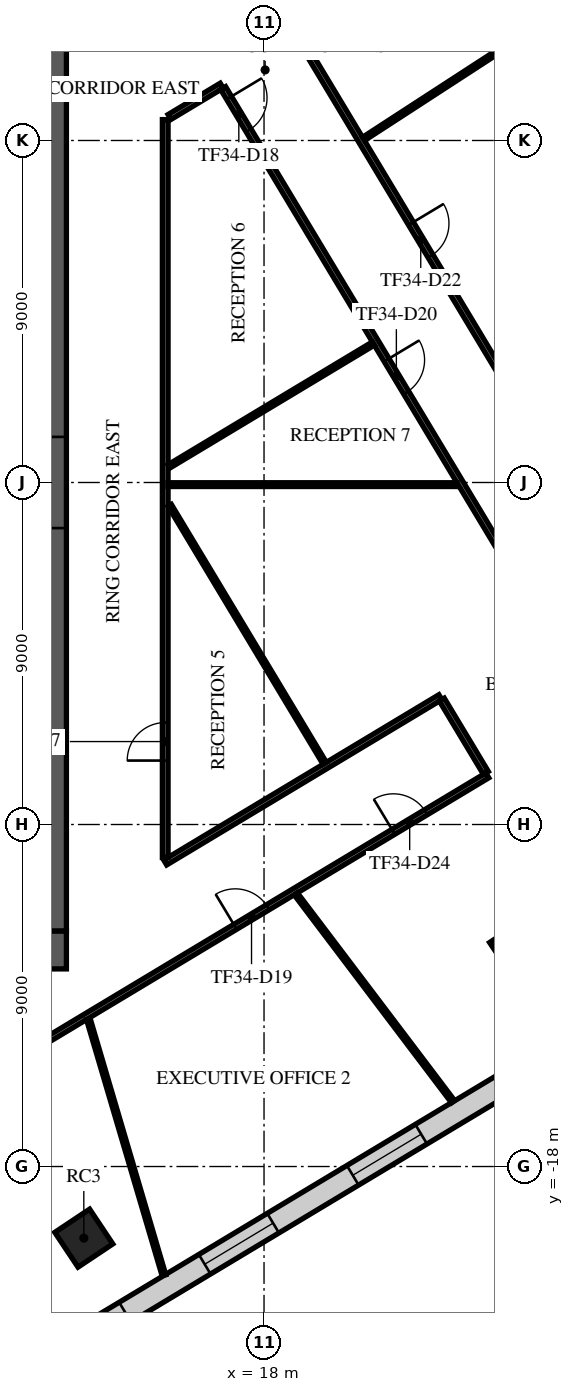
"""IFC4 building model, lengths in metres.
Left out: names, types, materials, properties, quantities, classifications, styles, units other than length and angle.
Written with IfcOpenShell. Run it as: python <this file> out.ifc"""

import sys

from ifc_helpers import new_model, si_unit, direction, frame, frame_2d, origin, origin_2d, place, context, subcontext, project, spatial, rectangle, extrude, element, fill, save


model = new_model("IFC4")
c1 = context("Model", 3, precision=1e-05, world=origin(), true_north=direction((0.0, 1.0)))
c2 = subcontext(c1, "Body", "Model", "MODEL_VIEW")
j1 = project(units=[si_unit("LENGTHUNIT", "METRE"), si_unit("PLANEANGLEUNIT", "RADIAN")], contexts=[c1])
p1 = place(None, origin())
s1 = spatial("IfcSite", under=j1, at=p1, CompositionType="ELEMENT")
p2 = place(p1, origin())
s2 = spatial("IfcBuilding", under=s1, at=p2, CompositionType="ELEMENT")
p3 = place(p2, frame((0.0, 0.0, 147.7)))
s3 = spatial("IfcBuildingStorey", under=s2, at=p3, CompositionType="ELEMENT", Elevation=147.7)
for number, where, z_axis, x_axis in (
    (1, (13.258, -19.885, 0.0), (0.0, 0.0, 1.0), (0.832, 0.555, 0.0)),
    (2, (24.699, -12.258, 0.0), (0.0, 0.0, 1.0), (0.832, 0.555, 0.0)),
):
    element("IfcColumn", number, at=place(p3, frame(where, z_axis=z_axis, x_axis=x_axis)), inside=s3, PredefinedType="COLUMN", context=c2, shape_type="SweptSolid", body=[
        extrude(rectangle(XDim=1.1, YDim=1.1, at=origin_2d()), origin(), (0.0, 0.0, 1.0), 4.0),
    ])
p4 = place(p3, frame((-12.8, -12.3, 0.0), z_axis=(0.0, 0.0, 1.0), x_axis=(1.0, 0.0, 0.0)))
e3 = element("IfcWall", 3, at=p4, inside=s3, PredefinedType="SHEAR", context=c2, shape_type="SweptSolid", body=[
    extrude(rectangle(XDim=25.6, YDim=1.0, at=frame_2d((12.8, 0.0))), origin(), (0.0, 0.0, 1.0), 3.6),
])
p5 = place(p4, frame((7.7, 0.0, 0.0)))
e4 = element("IfcOpeningElement", 4, at=p5, cuts=e3, PredefinedType="OPENING", context=c2, shape_type="SweptSolid", body=[
    extrude(rectangle(XDim=2.0, YDim=2.1, at=frame_2d((1.0, 1.05))), frame((0.0, 0.51, 0.0), z_axis=(0.0, -1.0, 0.0), x_axis=(1.0, 0.0, 0.0)), (0.0, 0.0, 1.0), 1.02),
])
p6 = place(p4, frame((17.825, 0.0, 0.0)))
e5 = element("IfcOpeningElement", 5, at=p6, cuts=e3, PredefinedType="OPENING", context=c2, shape_type="SweptSolid", body=[
    extrude(rectangle(XDim=1.2, YDim=2.1, at=frame_2d((0.6, 1.05))), frame((0.0, 0.51, 0.0), z_axis=(0.0, -1.0, 0.0), x_axis=(1.0, 0.0, 0.0)), (0.0, 0.0, 1.0), 1.02),
])
p7 = place(p4, frame((1.975, 0.0, 0.0)))
e6 = element("IfcOpeningElement", 6, at=p7, cuts=e3, PredefinedType="OPENING", context=c2, shape_type="SweptSolid", body=[
    extrude(rectangle(XDim=1.2, YDim=2.1, at=frame_2d((0.6, 1.05))), frame((0.0, 0.51, 0.0), z_axis=(0.0, -1.0, 0.0), x_axis=(1.0, 0.0, 0.0)), (0.0, 0.0, 1.0), 1.02),
])
p8 = place(p4, frame((22.425, 0.0, 0.0)))
e7 = element("IfcOpeningElement", 7, at=p8, cuts=e3, PredefinedType="OPENING", context=c2, shape_type="SweptSolid", body=[
    extrude(rectangle(XDim=1.2, YDim=2.1, at=frame_2d((0.6, 1.05))), frame((0.0, 0.51, 0.0), z_axis=(0.0, -1.0, 0.0), x_axis=(1.0, 0.0, 0.0)), (0.0, 0.0, 1.0), 1.02),
])
p9 = place(p3, frame((12.3, -11.8, 0.0), z_axis=(0.0, 0.0, 1.0), x_axis=(0.0, 1.0, 0.0)))
e8 = element("IfcWall", 8, at=p9, inside=s3, PredefinedType="SHEAR", context=c2, shape_type="SweptSolid", body=[
    extrude(rectangle(XDim=23.6, YDim=1.0, at=frame_2d((11.8, 0.0))), origin(), (0.0, 0.0, 1.0), 3.6),
])
p10 = place(p9, frame((10.6, 0.0, 0.0)))
e9 = element("IfcOpeningElement", 9, at=p10, cuts=e8, PredefinedType="OPENING", context=c2, shape_type="SweptSolid", body=[
    extrude(rectangle(XDim=2.4, YDim=2.4, at=frame_2d((1.2, 1.2))), frame((0.0, 0.51, 0.0), z_axis=(0.0, -1.0, 0.0), x_axis=(1.0, 0.0, 0.0)), (0.0, 0.0, 1.0), 1.02),
])
p11 = place(p3, frame((-7.88, -35.184, 0.0), z_axis=(0.0, 0.0, 1.0), x_axis=(0.857165846238, 0.515040495536, 0.0)))
e10 = element("IfcWall", 10, at=p11, inside=s3, PredefinedType="STANDARD", context=c2, shape_type="SweptSolid", body=[
    extrude(rectangle(XDim=49.751, YDim=0.6, at=frame_2d((24.876, 0.0))), origin(), (0.0, 0.0, 1.0), 3.6),
])
p12 = place(p11, frame((1.161, 0.0, 0.9)))
e11 = element("IfcOpeningElement", 11, at=p12, cuts=e10, PredefinedType="OPENING", context=c2, shape_type="SweptSolid", body=[
    extrude(rectangle(XDim=2.1, YDim=2.1, at=frame_2d((1.05, 1.05))), frame((0.0, 0.31, 0.0), z_axis=(0.0, -1.0, 0.0), x_axis=(1.0, 0.0, 0.0)), (0.0, 0.0, 1.0), 0.62),
])
p13 = place(p11, frame((5.644, 0.0, 0.9)))
e12 = element("IfcOpeningElement", 12, at=p13, cuts=e10, PredefinedType="OPENING", context=c2, shape_type="SweptSolid", body=[
    extrude(rectangle(XDim=2.1, YDim=2.1, at=frame_2d((1.05, 1.05))), frame((0.0, 0.31, 0.0), z_axis=(0.0, -1.0, 0.0), x_axis=(1.0, 0.0, 0.0)), (0.0, 0.0, 1.0), 0.62),
])
p14 = place(p11, frame((10.189, 0.0, 0.9)))
e13 = element("IfcOpeningElement", 13, at=p14, cuts=e10, PredefinedType="OPENING", context=c2, shape_type="SweptSolid", body=[
    extrude(rectangle(XDim=2.1, YDim=2.1, at=frame_2d((1.05, 1.05))), frame((0.0, 0.31, 0.0), z_axis=(0.0, -1.0, 0.0), x_axis=(1.0, 0.0, 0.0)), (0.0, 0.0, 1.0), 0.62),
])
p15 = place(p11, frame((14.735, 0.0, 0.9)))
e14 = element("IfcOpeningElement", 14, at=p15, cuts=e10, PredefinedType="OPENING", context=c2, shape_type="SweptSolid", body=[
    extrude(rectangle(XDim=2.1, YDim=2.1, at=frame_2d((1.05, 1.05))), frame((0.0, 0.31, 0.0), z_axis=(0.0, -1.0, 0.0), x_axis=(1.0, 0.0, 0.0)), (0.0, 0.0, 1.0), 0.62),
])
p16 = place(p11, frame((19.28, 0.0, 0.9)))
e15 = element("IfcOpeningElement", 15, at=p16, cuts=e10, PredefinedType="OPENING", context=c2, shape_type="SweptSolid", body=[
    extrude(rectangle(XDim=2.1, YDim=2.1, at=frame_2d((1.05, 1.05))), frame((0.0, 0.31, 0.0), z_axis=(0.0, -1.0, 0.0), x_axis=(1.0, 0.0, 0.0)), (0.0, 0.0, 1.0), 0.62),
])
p17 = place(p11, frame((23.826, 0.0, 0.9)))
e16 = element("IfcOpeningElement", 16, at=p17, cuts=e10, PredefinedType="OPENING", context=c2, shape_type="SweptSolid", body=[
    extrude(rectangle(XDim=2.1, YDim=2.1, at=frame_2d((1.05, 1.05))), frame((0.0, 0.31, 0.0), z_axis=(0.0, -1.0, 0.0), x_axis=(1.0, 0.0, 0.0)), (0.0, 0.0, 1.0), 0.62),
])
p18 = place(p11, frame((28.371, 0.0, 0.9)))
e17 = element("IfcOpeningElement", 17, at=p18, cuts=e10, PredefinedType="OPENING", context=c2, shape_type="SweptSolid", body=[
    extrude(rectangle(XDim=2.1, YDim=2.1, at=frame_2d((1.05, 1.05))), frame((0.0, 0.31, 0.0), z_axis=(0.0, -1.0, 0.0), x_axis=(1.0, 0.0, 0.0)), (0.0, 0.0, 1.0), 0.62),
])
p19 = place(p11, frame((32.917, 0.0, 0.9)))
e18 = element("IfcOpeningElement", 18, at=p19, cuts=e10, PredefinedType="OPENING", context=c2, shape_type="SweptSolid", body=[
    extrude(rectangle(XDim=2.1, YDim=2.1, at=frame_2d((1.05, 1.05))), frame((0.0, 0.31, 0.0), z_axis=(0.0, -1.0, 0.0), x_axis=(1.0, 0.0, 0.0)), (0.0, 0.0, 1.0), 0.62),
])
p20 = place(p11, frame((37.462, 0.0, 0.9)))
e19 = element("IfcOpeningElement", 19, at=p20, cuts=e10, PredefinedType="OPENING", context=c2, shape_type="SweptSolid", body=[
    extrude(rectangle(XDim=2.1, YDim=2.1, at=frame_2d((1.05, 1.05))), frame((0.0, 0.31, 0.0), z_axis=(0.0, -1.0, 0.0), x_axis=(1.0, 0.0, 0.0)), (0.0, 0.0, 1.0), 0.62),
])
p21 = place(p11, frame((42.008, 0.0, 0.9)))
e20 = element("IfcOpeningElement", 20, at=p21, cuts=e10, PredefinedType="OPENING", context=c2, shape_type="SweptSolid", body=[
    extrude(rectangle(XDim=2.1, YDim=2.1, at=frame_2d((1.05, 1.05))), frame((0.0, 0.31, 0.0), z_axis=(0.0, -1.0, 0.0), x_axis=(1.0, 0.0, 0.0)), (0.0, 0.0, 1.0), 0.62),
])
p22 = place(p11, frame((46.491, 0.0, 0.9)))
e21 = element("IfcOpeningElement", 21, at=p22, cuts=e10, PredefinedType="OPENING", context=c2, shape_type="SweptSolid", body=[
    extrude(rectangle(XDim=2.1, YDim=2.1, at=frame_2d((1.05, 1.05))), frame((0.0, 0.31, 0.0), z_axis=(0.0, -1.0, 0.0), x_axis=(1.0, 0.0, 0.0)), (0.0, 0.0, 1.0), 0.62),
])
p23 = place(p3, frame((36.416, -2.94, 0.0), z_axis=(0.0, 0.0, 1.0), x_axis=(-0.515039615037, 0.857166375299, 0.0)))
e22 = element("IfcWall", 22, at=p23, inside=s3, PredefinedType="STANDARD", context=c2, shape_type="SweptSolid", body=[
    extrude(rectangle(XDim=42.176, YDim=0.6, at=frame_2d((21.088, 0.0))), origin(), (0.0, 0.0, 1.0), 3.6),
])
p24 = place(p23, frame((1.138, 0.0, 0.9)))
e23 = element("IfcOpeningElement", 23, at=p24, cuts=e22, PredefinedType="OPENING", context=c2, shape_type="SweptSolid", body=[
    extrude(rectangle(XDim=2.3, YDim=2.1, at=frame_2d((1.15, 1.05))), frame((0.0, 0.31, 0.0), z_axis=(0.0, -1.0, 0.0), x_axis=(1.0, 0.0, 0.0)), (0.0, 0.0, 1.0), 0.62),
])
p25 = place(p23, frame((5.776, 0.0, 0.9)))
e24 = element("IfcOpeningElement", 24, at=p25, cuts=e22, PredefinedType="OPENING", context=c2, shape_type="SweptSolid", body=[
    extrude(rectangle(XDim=2.3, YDim=2.1, at=frame_2d((1.15, 1.05))), frame((0.0, 0.31, 0.0), z_axis=(0.0, -1.0, 0.0), x_axis=(1.0, 0.0, 0.0)), (0.0, 0.0, 1.0), 0.62),
])
p26 = place(p23, frame((10.476, 0.0, 0.9)))
e25 = element("IfcOpeningElement", 25, at=p26, cuts=e22, PredefinedType="OPENING", context=c2, shape_type="SweptSolid", body=[
    extrude(rectangle(XDim=2.3, YDim=2.1, at=frame_2d((1.15, 1.05))), frame((0.0, 0.31, 0.0), z_axis=(0.0, -1.0, 0.0), x_axis=(1.0, 0.0, 0.0)), (0.0, 0.0, 1.0), 0.62),
])
p27 = place(p23, frame((15.176, 0.0, 0.9)))
e26 = element("IfcOpeningElement", 26, at=p27, cuts=e22, PredefinedType="OPENING", context=c2, shape_type="SweptSolid", body=[
    extrude(rectangle(XDim=2.3, YDim=2.1, at=frame_2d((1.15, 1.05))), frame((0.0, 0.31, 0.0), z_axis=(0.0, -1.0, 0.0), x_axis=(1.0, 0.0, 0.0)), (0.0, 0.0, 1.0), 0.62),
])
p28 = place(p23, frame((19.876, 0.0, 0.9)))
e27 = element("IfcOpeningElement", 27, at=p28, cuts=e22, PredefinedType="OPENING", context=c2, shape_type="SweptSolid", body=[
    extrude(rectangle(XDim=2.3, YDim=2.1, at=frame_2d((1.15, 1.05))), frame((0.0, 0.31, 0.0), z_axis=(0.0, -1.0, 0.0), x_axis=(1.0, 0.0, 0.0)), (0.0, 0.0, 1.0), 0.62),
])
p29 = place(p23, frame((24.576, 0.0, 0.9)))
e28 = element("IfcOpeningElement", 28, at=p29, cuts=e22, PredefinedType="OPENING", context=c2, shape_type="SweptSolid", body=[
    extrude(rectangle(XDim=2.3, YDim=2.1, at=frame_2d((1.15, 1.05))), frame((0.0, 0.31, 0.0), z_axis=(0.0, -1.0, 0.0), x_axis=(1.0, 0.0, 0.0)), (0.0, 0.0, 1.0), 0.62),
])
p30 = place(p23, frame((29.276, 0.0, 0.9)))
e29 = element("IfcOpeningElement", 29, at=p30, cuts=e22, PredefinedType="OPENING", context=c2, shape_type="SweptSolid", body=[
    extrude(rectangle(XDim=2.3, YDim=2.1, at=frame_2d((1.15, 1.05))), frame((0.0, 0.31, 0.0), z_axis=(0.0, -1.0, 0.0), x_axis=(1.0, 0.0, 0.0)), (0.0, 0.0, 1.0), 0.62),
])
p31 = place(p23, frame((33.976, 0.0, 0.9)))
e30 = element("IfcOpeningElement", 30, at=p31, cuts=e22, PredefinedType="OPENING", context=c2, shape_type="SweptSolid", body=[
    extrude(rectangle(XDim=2.3, YDim=2.1, at=frame_2d((1.15, 1.05))), frame((0.0, 0.31, 0.0), z_axis=(0.0, -1.0, 0.0), x_axis=(1.0, 0.0, 0.0)), (0.0, 0.0, 1.0), 0.62),
])
p32 = place(p23, frame((38.676, 0.0, 0.9)))
e31 = element("IfcOpeningElement", 31, at=p32, cuts=e22, PredefinedType="OPENING", context=c2, shape_type="SweptSolid", body=[
    extrude(rectangle(XDim=2.3, YDim=2.1, at=frame_2d((1.15, 1.05))), frame((0.0, 0.31, 0.0), z_axis=(0.0, -1.0, 0.0), x_axis=(1.0, 0.0, 0.0)), (0.0, 0.0, 1.0), 0.62),
])
p33 = place(p3, frame((-4.341, -24.661, 0.0), z_axis=(0.0, 0.0, 1.0), x_axis=(0.85716751976, 0.515037710336, 0.0)))
e32 = element("IfcWall", 32, at=p33, inside=s3, PredefinedType="PARTITIONING", context=c2, shape_type="SweptSolid", body=[
    extrude(rectangle(XDim=32.919, YDim=0.15, at=frame_2d((16.459, 0.0))), origin(), (0.0, 0.0, 1.0), 3.15),
])
p34 = place(p33, frame((11.932, 0.0, 0.0)))
e33 = element("IfcOpeningElement", 33, at=p34, cuts=e32, PredefinedType="OPENING", context=c2, shape_type="SweptSolid", body=[
    extrude(rectangle(XDim=1.0, YDim=2.1, at=frame_2d((0.5, 1.05))), frame((0.0, 0.085, 0.0), z_axis=(0.0, -1.0, 0.0), x_axis=(1.0, 0.0, 0.0)), (0.0, 0.0, 1.0), 0.17),
])
p35 = place(p33, frame((25.18, 0.0, 0.0)))
e34 = element("IfcOpeningElement", 34, at=p35, cuts=e32, PredefinedType="OPENING", context=c2, shape_type="SweptSolid", body=[
    extrude(rectangle(XDim=1.0, YDim=2.1, at=frame_2d((0.5, 1.05))), frame((0.0, 0.085, 0.0), z_axis=(0.0, -1.0, 0.0), x_axis=(1.0, 0.0, 0.0)), (0.0, 0.0, 1.0), 0.17),
])
p36 = place(p33, frame((30.035, 0.0, 0.0)))
e35 = element("IfcOpeningElement", 35, at=p36, cuts=e32, PredefinedType="OPENING", context=c2, shape_type="SweptSolid", body=[
    extrude(rectangle(XDim=1.0, YDim=2.1, at=frame_2d((0.5, 1.05))), frame((0.0, 0.085, 0.0), z_axis=(0.0, -1.0, 0.0), x_axis=(1.0, 0.0, 0.0)), (0.0, 0.0, 1.0), 0.17),
])
p37 = place(p3, frame((11.76, 23.633, 0.0), z_axis=(0.0, 0.0, 1.0), x_axis=(0.515060503771, -0.857153823684, 0.0)))
e36 = element("IfcWall", 36, at=p37, inside=s3, PredefinedType="PARTITIONING", context=c2, shape_type="SweptSolid", body=[
    extrude(rectangle(XDim=28.475, YDim=0.15, at=frame_2d((14.238, 0.0))), origin(), (0.0, 0.0, 1.0), 3.15),
])
p38 = place(p37, frame((12.149, 0.0, 0.0)))
e37 = element("IfcOpeningElement", 37, at=p38, cuts=e36, PredefinedType="OPENING", context=c2, shape_type="SweptSolid", body=[
    extrude(rectangle(XDim=1.0, YDim=2.1, at=frame_2d((0.5, 1.05))), frame((0.0, 0.085, 0.0), z_axis=(0.0, -1.0, 0.0), x_axis=(1.0, 0.0, 0.0)), (0.0, 0.0, 1.0), 0.17),
])
p39 = place(p37, frame((19.62, 0.0, 0.0)))
e38 = element("IfcOpeningElement", 38, at=p39, cuts=e36, PredefinedType="OPENING", context=c2, shape_type="SweptSolid", body=[
    extrude(rectangle(XDim=1.0, YDim=2.1, at=frame_2d((0.5, 1.05))), frame((0.0, 0.085, 0.0), z_axis=(0.0, -1.0, 0.0), x_axis=(1.0, 0.0, 0.0)), (0.0, 0.0, 1.0), 0.17),
])
p40 = place(p37, frame((26.005, 0.0, 0.0)))
e39 = element("IfcOpeningElement", 39, at=p40, cuts=e36, PredefinedType="OPENING", context=c2, shape_type="SweptSolid", body=[
    extrude(rectangle(XDim=1.8, YDim=2.1, at=frame_2d((0.9, 1.05))), frame((0.0, 0.085, 0.0), z_axis=(0.0, -1.0, 0.0), x_axis=(1.0, 0.0, 0.0)), (0.0, 0.0, 1.0), 0.17),
])
p41 = place(p3, frame((15.4, -10.0, 0.0), z_axis=(0.0, 0.0, 1.0), x_axis=(0.857122913924, 0.515111939705, 0.0)))
e40 = element("IfcWall", 40, at=p41, inside=s3, PredefinedType="PARTITIONING", context=c2, shape_type="SweptSolid", body=[
    extrude(rectangle(XDim=8.447, YDim=0.15, at=frame_2d((4.223, 0.0))), origin(), (0.0, 0.0, 1.0), 3.15),
])
p42 = place(p3, frame((15.4, -9.867, 0.0), z_axis=(0.0, 0.0, 1.0), x_axis=(0.0, 1.0, 0.0)))
e41 = element("IfcWall", 41, at=p42, inside=s3, PredefinedType="PARTITIONING", context=c2, shape_type="SweptSolid", body=[
    extrude(rectangle(XDim=19.417, YDim=0.15, at=frame_2d((9.709, 0.0))), origin(), (0.0, 0.0, 1.0), 3.15),
])
p43 = place(p42, frame((2.55, 0.0, 0.0)))
e42 = element("IfcOpeningElement", 42, at=p43, cuts=e41, PredefinedType="OPENING", context=c2, shape_type="SweptSolid", body=[
    extrude(rectangle(XDim=1.0, YDim=2.1, at=frame_2d((0.5, 1.05))), frame((0.0, 0.085, 0.0), z_axis=(0.0, -1.0, 0.0), x_axis=(1.0, 0.0, 0.0)), (0.0, 0.0, 1.0), 0.17),
])
p44 = place(p3, frame((15.514, 9.618, 0.0), z_axis=(0.0, 0.0, 1.0), x_axis=(0.857129434102, 0.515101090268, 0.0)))
e43 = element("IfcWall", 43, at=p44, inside=s3, PredefinedType="PARTITIONING", context=c2, shape_type="SweptSolid", body=[
    extrude(rectangle(XDim=1.601, YDim=0.15, at=frame_2d((0.801, 0.0))), origin(), (0.0, 0.0, 1.0), 3.15),
])
p45 = place(p3, frame((16.925, 10.379, 0.0), z_axis=(0.0, 0.0, 1.0), x_axis=(0.515094231421, -0.857133555962, 0.0)))
e44 = element("IfcWall", 44, at=p45, inside=s3, PredefinedType="PARTITIONING", context=c2, shape_type="SweptSolid", body=[
    extrude(rectangle(XDim=14.455, YDim=0.15, at=frame_2d((7.228, 0.0))), origin(), (0.0, 0.0, 1.0), 3.15),
])
p46 = place(p45, frame((0.3, 0.0, 0.0)))
e45 = element("IfcOpeningElement", 45, at=p46, cuts=e44, PredefinedType="OPENING", context=c2, shape_type="SweptSolid", body=[
    extrude(rectangle(XDim=1.0, YDim=2.1, at=frame_2d((0.5, 1.05))), frame((0.0, 0.085, 0.0), z_axis=(0.0, -1.0, 0.0), x_axis=(1.0, 0.0, 0.0)), (0.0, 0.0, 1.0), 0.17),
])
p47 = place(p45, frame((8.348, 0.0, 0.0)))
e46 = element("IfcOpeningElement", 46, at=p47, cuts=e44, PredefinedType="OPENING", context=c2, shape_type="SweptSolid", body=[
    extrude(rectangle(XDim=1.0, YDim=2.1, at=frame_2d((0.5, 1.05))), frame((0.0, 0.085, 0.0), z_axis=(0.0, -1.0, 0.0), x_axis=(1.0, 0.0, 0.0)), (0.0, 0.0, 1.0), 0.17),
])
p48 = place(p3, frame((22.679, -5.713, 0.0), z_axis=(0.0, 0.0, 1.0), x_axis=(0.514878598907, -0.857263103363, 0.0)))
e47 = element("IfcWall", 47, at=p48, inside=s3, PredefinedType="PARTITIONING", context=c2, shape_type="SweptSolid", body=[
    extrude(rectangle(XDim=2.25, YDim=0.15, at=frame_2d((1.125, 0.0))), origin(), (0.0, 0.0, 1.0), 3.15),
])
p49 = place(p3, frame((13.377, -14.118, 0.0), z_axis=(0.0, 0.0, 1.0), x_axis=(0.282991293252, -0.959122478072, 0.0)))
e48 = element("IfcWall", 48, at=p49, inside=s3, PredefinedType="PARTITIONING", context=c2, shape_type="SweptSolid", body=[
    extrude(rectangle(XDim=7.033, YDim=0.1, at=frame_2d((3.517, 0.0))), origin(), (0.0, 0.0, 1.0), 2.9),
])
p50 = place(p3, frame((15.475, -0.056, 0.0), z_axis=(0.0, 0.0, 1.0), x_axis=(1.0, 0.0, 0.0)))
e49 = element("IfcWall", 49, at=p50, inside=s3, PredefinedType="PARTITIONING", context=c2, shape_type="SweptSolid", body=[
    extrude(rectangle(XDim=7.602, YDim=0.1, at=frame_2d((3.801, 0.0))), origin(), (0.0, 0.0, 1.0), 3.6),
])
p51 = place(p3, frame((15.501, 0.426, 0.0), z_axis=(0.0, 0.0, 1.0), x_axis=(0.857114899057, 0.515125275845, 0.0)))
e50 = element("IfcWall", 50, at=p51, inside=s3, PredefinedType="PARTITIONING", context=c2, shape_type="SweptSolid", body=[
    extrude(rectangle(XDim=6.272, YDim=0.1, at=frame_2d((3.136, 0.0))), origin(), (0.0, 0.0, 1.0), 3.15),
])
p52 = place(p3, frame((15.518, -0.601, 0.0), z_axis=(0.0, 0.0, 1.0), x_axis=(0.515094007399, -0.857133690588, 0.0)))
e51 = element("IfcWall", 51, at=p52, inside=s3, PredefinedType="PARTITIONING", context=c2, shape_type="SweptSolid", body=[
    extrude(rectangle(XDim=7.92, YDim=0.1, at=frame_2d((3.96, 0.0))), origin(), (0.0, 0.0, 1.0), 3.15),
])
p53 = place(p3, frame((18.838, -10.827, 0.0), z_axis=(0.0, 0.0, 1.0), x_axis=(0.603408389403, -0.797432326657, 0.0)))
e52 = element("IfcWall", 52, at=p53, inside=s3, PredefinedType="PARTITIONING", context=c2, shape_type="SweptSolid", body=[
    extrude(rectangle(XDim=6.854, YDim=0.1, at=frame_2d((3.427, 0.0))), origin(), (0.0, 0.0, 1.0), 2.9),
])
p54 = place(p3, frame((20.618, 9.042, 0.0), z_axis=(0.0, 0.0, 1.0), x_axis=(0.838556384035, 0.544814822479, 0.0)))
e53 = element("IfcWall", 53, at=p54, inside=s3, PredefinedType="PARTITIONING", context=c2, shape_type="SweptSolid", body=[
    extrude(rectangle(XDim=7.072, YDim=0.1, at=frame_2d((3.536, 0.0))), origin(), (0.0, 0.0, 1.0), 2.9),
])
p55 = place(p17, origin())
e54 = element("IfcWindow", 54, at=p55, inside=s3, PartitioningType="SINGLE_PANEL", PredefinedType="WINDOW", context=c2, shape_type="SweptSolid", body=[
    extrude(rectangle(XDim=2.1, YDim=2.1, at=frame_2d((1.05, 1.05))), frame((0.0, 0.03, 0.0), z_axis=(0.0, -1.0, 0.0), x_axis=(1.0, 0.0, 0.0)), (0.0, 0.0, 1.0), 0.06),
])
fill(e16, e54)
p56 = place(p18, origin())
e55 = element("IfcWindow", 55, at=p56, inside=s3, PartitioningType="SINGLE_PANEL", PredefinedType="WINDOW", context=c2, shape_type="SweptSolid", body=[
    extrude(rectangle(XDim=2.1, YDim=2.1, at=frame_2d((1.05, 1.05))), frame((0.0, 0.03, 0.0), z_axis=(0.0, -1.0, 0.0), x_axis=(1.0, 0.0, 0.0)), (0.0, 0.0, 1.0), 0.06),
])
fill(e17, e55)
p57 = place(p19, origin())
e56 = element("IfcWindow", 56, at=p57, inside=s3, PartitioningType="SINGLE_PANEL", PredefinedType="WINDOW", context=c2, shape_type="SweptSolid", body=[
    extrude(rectangle(XDim=2.1, YDim=2.1, at=frame_2d((1.05, 1.05))), frame((0.0, 0.03, 0.0), z_axis=(0.0, -1.0, 0.0), x_axis=(1.0, 0.0, 0.0)), (0.0, 0.0, 1.0), 0.06),
])
fill(e18, e56)
p58 = place(p43, frame((1.0, 0.0, 0.0), z_axis=(0.0, 0.0, 1.0), x_axis=(-1.0, 0.0, 0.0)))
e57 = element("IfcDoor", 57, at=p58, inside=s3, OperationType="SINGLE_SWING_RIGHT", PredefinedType="DOOR", context=c2, shape_type="SweptSolid", body=[
    extrude(rectangle(XDim=1.0, YDim=2.1, at=frame_2d((0.5, 1.05))), frame((0.0, 0.025, 0.0), z_axis=(0.0, -1.0, 0.0), x_axis=(1.0, 0.0, 0.0)), (0.0, 0.0, 1.0), 0.05),
])
fill(e42, e57)
p59 = place(p46, frame((1.0, 0.0, 0.0), z_axis=(0.0, 0.0, 1.0), x_axis=(-1.0, 0.0, 0.0)))
e58 = element("IfcDoor", 58, at=p59, inside=s3, OperationType="SINGLE_SWING_RIGHT", PredefinedType="DOOR", context=c2, shape_type="SweptSolid", body=[
    extrude(rectangle(XDim=1.0, YDim=2.1, at=frame_2d((0.5, 1.05))), frame((0.0, 0.025, 0.0), z_axis=(0.0, -1.0, 0.0), x_axis=(1.0, 0.0, 0.0)), (0.0, 0.0, 1.0), 0.05),
])
fill(e45, e58)
p60 = place(p35, frame((1.0, 0.0, 0.0), z_axis=(0.0, 0.0, 1.0), x_axis=(-1.0, 0.0, 0.0)))
e59 = element("IfcDoor", 59, at=p60, inside=s3, OperationType="SINGLE_SWING_LEFT", PredefinedType="DOOR", context=c2, shape_type="SweptSolid", body=[
    extrude(rectangle(XDim=1.0, YDim=2.1, at=frame_2d((0.5, 1.05))), frame((0.0, 0.025, 0.0), z_axis=(0.0, -1.0, 0.0), x_axis=(1.0, 0.0, 0.0)), (0.0, 0.0, 1.0), 0.05),
])
fill(e34, e59)
p61 = place(p47, frame((1.0, 0.0, 0.0), z_axis=(0.0, 0.0, 1.0), x_axis=(-1.0, 0.0, 0.0)))
e60 = element("IfcDoor", 60, at=p61, inside=s3, OperationType="SINGLE_SWING_RIGHT", PredefinedType="DOOR", context=c2, shape_type="SweptSolid", body=[
    extrude(rectangle(XDim=1.0, YDim=2.1, at=frame_2d((0.5, 1.05))), frame((0.0, 0.025, 0.0), z_axis=(0.0, -1.0, 0.0), x_axis=(1.0, 0.0, 0.0)), (0.0, 0.0, 1.0), 0.05),
])
fill(e46, e60)
p62 = place(p39, origin())
e61 = element("IfcDoor", 61, at=p62, inside=s3, OperationType="SINGLE_SWING_LEFT", PredefinedType="DOOR", context=c2, shape_type="SweptSolid", body=[
    extrude(rectangle(XDim=1.0, YDim=2.1, at=frame_2d((0.5, 1.05))), frame((0.0, 0.025, 0.0), z_axis=(0.0, -1.0, 0.0), x_axis=(1.0, 0.0, 0.0)), (0.0, 0.0, 1.0), 0.05),
])
fill(e38, e61)
p63 = place(p36, frame((1.0, 0.0, 0.0), z_axis=(0.0, 0.0, 1.0), x_axis=(-1.0, 0.0, 0.0)))
e62 = element("IfcDoor", 62, at=p63, inside=s3, OperationType="SINGLE_SWING_RIGHT", PredefinedType="DOOR", context=c2, shape_type="SweptSolid", body=[
    extrude(rectangle(XDim=1.0, YDim=2.1, at=frame_2d((0.5, 1.05))), frame((0.0, 0.025, 0.0), z_axis=(0.0, -1.0, 0.0), x_axis=(1.0, 0.0, 0.0)), (0.0, 0.0, 1.0), 0.05),
])
fill(e35, e62)
save(model, sys.argv[1])
